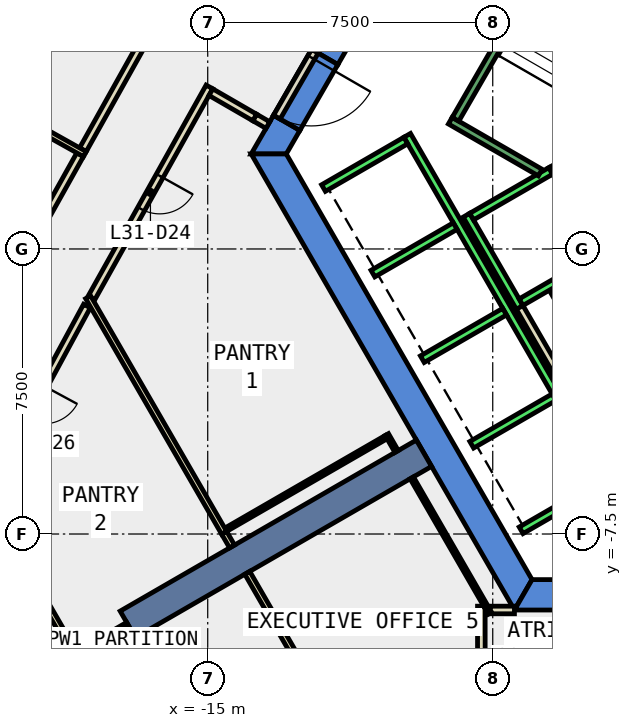
"""IFC4 building model, lengths in metres.
Left out: names, types, materials, properties, quantities, classifications, styles, units other than length and angle.
Written with IfcOpenShell. Run it as: python <this file> out.ifc"""

import sys

from ifc_helpers import new_model, si_unit, direction, frame, frame_2d, origin, place, context, subcontext, project, spatial, polyline, rectangle, outline, extrude, element, fill, save


model = new_model("IFC4")
c1 = context("Model", 3, precision=1e-05, world=origin(), true_north=direction((0.0, 1.0)))
c2 = subcontext(c1, "Body", "Model", "MODEL_VIEW")
j1 = project(units=[si_unit("LENGTHUNIT", "METRE"), si_unit("PLANEANGLEUNIT", "RADIAN")], contexts=[c1])
p1 = place(None, origin())
s1 = spatial("IfcSite", under=j1, at=p1, CompositionType="ELEMENT")
p2 = place(p1, origin())
s2 = spatial("IfcBuilding", under=s1, at=p2, CompositionType="ELEMENT")
p3 = place(p2, frame((0.0, 0.0, 142.4)))
s3 = spatial("IfcBuildingStorey", under=s2, at=p3, CompositionType="ELEMENT", Elevation=142.4)
p4 = place(p3, frame((0.0, 0.0, -0.4)))
e1 = element("IfcWall", 1, at=p4, inside=s3, PredefinedType="SHEAR", context=c2, shape_type="SweptSolid", body=[
    extrude(outline(polyline([(-12.267, 5.252), (-11.575, 4.852), (-6.466, 13.7), (-6.928, 14.5), (-12.267, 5.252)])), origin(), (0.0, 0.0, 1.0), 4.2),
])
p5 = place(p3, frame((0.0, 0.0, -0.4)))
e2 = element("IfcWall", 2, at=p5, inside=s3, PredefinedType="SHEAR", context=c2, shape_type="SweptSolid", body=[
    extrude(outline(polyline([(-12.575, 3.12), (-13.267, 3.52), (-13.856, 2.5), (-12.933, 2.5), (-12.575, 3.12)])), origin(), (0.0, 0.0, 1.0), 4.2),
])
p6 = place(p3, frame((0.0, 0.0, 3.6)))
e3 = element("IfcWall", 3, at=p6, inside=s3, PredefinedType="SHEAR", context=c2, shape_type="SweptSolid", body=[
    extrude(outline(polyline([(-13.267, 3.52), (-12.575, 3.12), (-11.575, 4.852), (-12.267, 5.252), (-13.267, 3.52)])), origin(), (0.0, 0.0, 1.0), 0.2),
])
p7 = place(p3, frame((0.0, 0.0, -0.4)))
e4 = element("IfcWall", 4, at=p7, inside=s3, PredefinedType="SHEAR", context=c2, shape_type="SweptSolid", body=[
    extrude(outline(polyline([(-13.856, 2.5), (-6.928, -9.5), (-6.466, -8.7), (-12.933, 2.5), (-13.856, 2.5)])), origin(), (0.0, 0.0, 1.0), 4.2),
])
p8 = place(p3, frame((0.0, 0.0, -0.4)))
e5 = element("IfcWall", 5, at=p8, inside=s3, PredefinedType="SHEAR", context=c2, shape_type="SweptSolid", body=[
    extrude(outline(polyline([(3.75, -9.5), (3.75, -8.7), (-6.466, -8.7), (-6.928, -9.5), (3.75, -9.5)])), origin(), (0.0, 0.0, 1.0), 4.2),
])
p9 = place(p3, frame((-9.31, -5.375, -0.4), z_axis=(0.0, 0.0, 1.0), x_axis=(-0.866017533419, -0.500013631625, 0.0)))
e6 = element("IfcWall", 6, at=p9, inside=s3, PredefinedType="SHEAR", context=c2, shape_type="SweptSolid", body=[
    extrude(rectangle(XDim=9.0, YDim=0.8, at=frame_2d((4.5, 0.0))), origin(), (0.0, 0.0, 1.0), 4.2),
])
p10 = place(p3, frame((-13.417, 3.26, 0.0), z_axis=(0.0, 0.0, 1.0), x_axis=(-0.866398669086, 0.499352927503, 0.0)))
e7 = element("IfcWall", 7, at=p10, inside=s3, PredefinedType="PARTITIONING", context=c2, shape_type="SweptSolid", body=[
    extrude(rectangle(XDim=0.4, YDim=0.2, at=frame_2d((0.2, 0.0))), origin(), (0.0, 0.0, 1.0), 2.4),
])
p11 = place(p3, frame((-14.955, 4.264, 0.0), z_axis=(0.0, 0.0, 1.0), x_axis=(-0.4879770011, -0.872856486713, 0.0)))
e8 = element("IfcWall", 8, at=p11, inside=s3, PredefinedType="PARTITIONING", context=c2, shape_type="SweptSolid", body=[
    extrude(rectangle(XDim=6.363, YDim=0.2, at=frame_2d((3.182, 0.0))), origin(), (0.0, 0.0, 1.0), 3.8),
])
p12 = place(p11, frame((2.681, 0.0, 0.0)))
e9 = element("IfcOpeningElement", 9, at=p12, cuts=e8, PredefinedType="OPENING", context=c2, shape_type="SweptSolid", body=[
    extrude(rectangle(XDim=1.0, YDim=2.1, at=frame_2d((0.5, 1.05))), frame((0.0, 0.11, 0.0), z_axis=(0.0, -1.0, 0.0), x_axis=(1.0, 0.0, 0.0)), (0.0, 0.0, 1.0), 0.22),
])
p13 = place(p3, frame((-18.178, -1.501, 0.0), z_axis=(0.0, 0.0, 1.0), x_axis=(-0.475923642768, -0.879486603795, 0.0)))
e10 = element("IfcWall", 10, at=p13, inside=s3, PredefinedType="PARTITIONING", context=c2, shape_type="SweptSolid", body=[
    extrude(rectangle(XDim=5.776, YDim=0.2, at=frame_2d((2.888, 0.0))), origin(), (0.0, 0.0, 1.0), 3.8),
])
p14 = place(p13, frame((2.388, 0.0, 0.0)))
e11 = element("IfcOpeningElement", 11, at=p14, cuts=e10, PredefinedType="OPENING", context=c2, shape_type="SweptSolid", body=[
    extrude(rectangle(XDim=1.0, YDim=2.1, at=frame_2d((0.5, 1.05))), frame((0.0, 0.11, 0.0), z_axis=(0.0, -1.0, 0.0), x_axis=(1.0, 0.0, 0.0)), (0.0, 0.0, 1.0), 0.22),
])
p15 = place(p3, frame((-18.284, 2.612, 0.0), z_axis=(0.0, 0.0, 1.0), x_axis=(0.487871212611, 0.872915620152, 0.0)))
e12 = element("IfcWall", 12, at=p15, inside=s3, PredefinedType="PARTITIONING", context=c2, shape_type="SweptSolid", body=[
    extrude(rectangle(XDim=3.402, YDim=0.2, at=frame_2d((1.701, 0.0))), origin(), (0.0, 0.0, 1.0), 3.8),
])
p16 = place(p3, frame((-20.018, -0.489, 0.0), z_axis=(0.0, 0.0, 1.0), x_axis=(0.48792588674, 0.872885060617, 0.0)))
e13 = element("IfcWall", 13, at=p16, inside=s3, PredefinedType="PARTITIONING", context=c2, shape_type="SweptSolid", body=[
    extrude(rectangle(XDim=3.403, YDim=0.2, at=frame_2d((1.701, 0.0))), origin(), (0.0, 0.0, 1.0), 3.8),
])
p17 = place(p3, frame((-5.126, -2.422, 0.0), z_axis=(0.0, 0.0, 1.0), x_axis=(-0.500062241894, 0.865989465428, 0.0)))
e14 = element("IfcWall", 14, at=p17, inside=s3, PredefinedType="PARTITIONING", context=c2, shape_type="SweptSolid", body=[
    extrude(rectangle(XDim=1.7, YDim=0.2, at=frame_2d((0.85, 0.0))), origin(), (0.0, 0.0, 1.0), 3.8),
])
p18 = place(p3, frame((-5.492, -3.788, 0.0), z_axis=(0.0, 0.0, 1.0), x_axis=(-0.500008949224, 0.866020236886, 0.0)))
e15 = element("IfcWall", 15, at=p18, inside=s3, PredefinedType="PARTITIONING", context=c2, shape_type="SweptSolid", body=[
    extrude(rectangle(XDim=2.68, YDim=0.2, at=frame_2d((1.34, 0.0))), origin(), (0.0, 0.0, 1.0), 3.8),
])
p19 = place(p3, frame((-7.572, -9.499, 0.0), z_axis=(0.0, 0.0, 1.0), x_axis=(1.0, 0.0, 0.0)))
e16 = element("IfcWall", 16, at=p19, inside=s3, PredefinedType="PARTITIONING", context=c2, shape_type="SweptSolid", body=[
    extrude(rectangle(XDim=0.643, YDim=0.2, at=frame_2d((0.322, 0.0))), origin(), (0.0, 0.0, 1.0), 3.8),
])
p20 = place(p3, frame((-7.8, -15.139, 0.0), z_axis=(0.0, 0.0, 1.0), x_axis=(0.0, 1.0, 0.0)))
e17 = element("IfcWall", 17, at=p20, inside=s3, PredefinedType="PARTITIONING", context=c2, shape_type="SweptSolid", body=[
    extrude(rectangle(XDim=5.74, YDim=0.2, at=frame_2d((2.87, 0.0))), origin(), (0.0, 0.0, 1.0), 3.8),
])
p21 = place(p20, frame((2.37, 0.0, 0.0)))
e18 = element("IfcOpeningElement", 18, at=p21, cuts=e17, PredefinedType="OPENING", context=c2, shape_type="SweptSolid", body=[
    extrude(rectangle(XDim=1.0, YDim=2.1, at=frame_2d((0.5, 1.05))), frame((0.0, 0.11, 0.0), z_axis=(0.0, -1.0, 0.0), x_axis=(1.0, 0.0, 0.0)), (0.0, 0.0, 1.0), 0.22),
])
p22 = place(p3, frame((-7.572, -9.586, 0.0), z_axis=(0.0, 0.0, 1.0), x_axis=(-0.500037407586, 0.866003805427, 0.0)))
e19 = element("IfcWall", 19, at=p22, inside=s3, PredefinedType="PARTITIONING", context=c2, shape_type="SweptSolid", body=[
    extrude(rectangle(XDim=4.115, YDim=0.1, at=frame_2d((2.058, 0.0))), origin(), (0.0, 0.0, 1.0), 3.8),
])
p23 = place(p3, frame((-10.305, -4.951, 0.0), z_axis=(0.0, 0.0, 1.0), x_axis=(-0.866031185235, -0.4999899861, 0.0)))
e20 = element("IfcWall", 20, at=p23, inside=s3, PredefinedType="PARTITIONING", context=c2, shape_type="SweptSolid", body=[
    extrude(rectangle(XDim=4.95, YDim=0.1, at=frame_2d((2.475, 0.0))), origin(), (0.0, 0.0, 1.0), 3.8),
])
p24 = place(p3, frame((-14.567, -7.469, 0.0), z_axis=(0.0, 0.0, 1.0), x_axis=(-0.500056007527, 0.865993065409, 0.0)))
e21 = element("IfcWall", 21, at=p24, inside=s3, PredefinedType="PARTITIONING", context=c2, shape_type="SweptSolid", body=[
    extrude(rectangle(XDim=7.159, YDim=0.15, at=frame_2d((3.58, 0.0))), origin(), (0.0, 0.0, 1.0), 3.8),
])
p25 = place(p3, frame((-14.359, -7.828, 0.0), z_axis=(0.0, 0.0, 1.0), x_axis=(-0.501453821755, 0.865184410775, 0.0)))
e22 = element("IfcWall", 22, at=p25, inside=s3, PredefinedType="PARTITIONING", context=c2, shape_type="SweptSolid", body=[
    extrude(rectangle(XDim=0.415, YDim=0.15, at=frame_2d((0.208, 0.0))), origin(), (0.0, 0.0, 1.0), 3.8),
])
p26 = place(p3, frame((-10.18, -15.068, 0.0), z_axis=(0.0, 0.0, 1.0), x_axis=(-0.499907901386, 0.866078570415, 0.0)))
e23 = element("IfcWall", 23, at=p26, inside=s3, PredefinedType="PARTITIONING", context=c2, shape_type="SweptSolid", body=[
    extrude(rectangle(XDim=7.56, YDim=0.15, at=frame_2d((3.78, 0.0))), origin(), (0.0, 0.0, 1.0), 3.8),
])
p27 = place(p3, frame((-17.108, -9.869, 0.0), z_axis=(0.0, 0.0, 1.0), x_axis=(-0.866054481515, -0.499949632511, 0.0)))
e24 = element("IfcWall", 24, at=p27, inside=s3, PredefinedType="PARTITIONING", context=c2, shape_type="SweptSolid", body=[
    extrude(rectangle(XDim=1.675, YDim=0.1, at=frame_2d((0.837, 0.0))), origin(), (0.0, 0.0, 1.0), 3.8),
])
p28 = place(p3, frame((-18.518, -10.625, 0.0), z_axis=(0.0, 0.0, 1.0), x_axis=(-0.50001189137, 0.86601853819, 0.0)))
e25 = element("IfcWall", 25, at=p28, inside=s3, PredefinedType="PARTITIONING", context=c2, shape_type="SweptSolid", body=[
    extrude(rectangle(XDim=4.746, YDim=0.15, at=frame_2d((2.373, 0.0))), origin(), (0.0, 0.0, 1.0), 3.8),
])
p29 = place(p3, frame((-18.234, 2.497, 0.0), z_axis=(0.0, 0.0, 1.0), x_axis=(-0.872820235044, 0.4880418397, 0.0)))
e26 = element("IfcWall", 26, at=p29, inside=s3, PredefinedType="PARTITIONING", context=c2, shape_type="SweptSolid", body=[
    extrude(rectangle(XDim=6.7, YDim=0.15, at=frame_2d((3.35, 0.0))), origin(), (0.0, 0.0, 1.0), 3.8),
])
p30 = place(p3, frame((-12.18, 5.202, 0.0), z_axis=(0.0, 0.0, 1.0), x_axis=(-0.50002537861, -0.866010750942, 0.0)))
e27 = element("IfcWall", 27, at=p30, inside=s3, PredefinedType="PARTITIONING", context=c2, shape_type="SweptSolid", body=[
    extrude(rectangle(XDim=2.0, YDim=0.2, at=frame_2d((1.0, 0.0))), origin(), (0.0, 0.0, 1.0), 2.4),
])
p31 = place(p30, frame((0.19, 0.0, 0.0)))
e28 = element("IfcOpeningElement", 28, at=p31, cuts=e27, PredefinedType="OPENING", context=c2, shape_type="SweptSolid", body=[
    extrude(rectangle(XDim=1.8, YDim=2.1, at=frame_2d((0.9, 1.05))), frame((0.0, 0.11, 0.0), z_axis=(0.0, -1.0, 0.0), x_axis=(1.0, 0.0, 0.0)), (0.0, 0.0, 1.0), 0.22),
])
p32 = place(p3, frame((-10.03, -5.329, 0.0), z_axis=(0.0, 0.0, 1.0), x_axis=(-0.499352927503, 0.866398669086, 0.0)))
e29 = element("IfcWall", 29, at=p32, inside=s3, PredefinedType="PARTITIONING", context=c2, shape_type="SweptSolid", body=[
    extrude(rectangle(XDim=0.515, YDim=0.1, at=frame_2d((0.257, 0.0))), origin(), (0.0, 0.0, 1.0), 3.8),
])
p33 = place(p3, frame((-13.764, 3.46, 0.0), z_axis=(0.0, 0.0, 1.0), x_axis=(-0.865932130826, 0.500161518715, 0.0)))
e30 = element("IfcWall", 30, at=p33, inside=s3, PredefinedType="PARTITIONING", context=c2, shape_type="SweptSolid", body=[
    extrude(rectangle(XDim=1.332, YDim=0.2, at=frame_2d((0.666, 0.0))), origin(), (0.0, 0.0, 1.0), 3.8),
])
p34 = place(p3, frame((-5.94, 2.188, 0.0), z_axis=(0.0, 0.0, 1.0), x_axis=(0.49994636267, -0.866056369097, 0.0)))
e31 = element("IfcWall", 31, at=p34, inside=s3, PredefinedType="STANDARD", context=c2, shape_type="SweptSolid", body=[
    extrude(rectangle(XDim=2.8, YDim=0.2, at=frame_2d((1.4, 0.0))), origin(), (0.0, 0.0, 1.0), 3.8),
])
p35 = place(p34, frame((1.225, 0.0, 0.0)))
e32 = element("IfcOpeningElement", 32, at=p35, cuts=e31, PredefinedType="OPENING", context=c2, shape_type="SweptSolid", body=[
    extrude(rectangle(XDim=1.1, YDim=2.1, at=frame_2d((0.55, 1.05))), frame((0.0, 0.11, 0.0), z_axis=(0.0, -1.0, 0.0), x_axis=(1.0, 0.0, 0.0)), (0.0, 0.0, 1.0), 0.22),
])
p36 = place(p3, frame((-8.192, 0.888, 0.0), z_axis=(0.0, 0.0, 1.0), x_axis=(0.49994636267, -0.866056369097, 0.0)))
e33 = element("IfcWall", 33, at=p36, inside=s3, PredefinedType="STANDARD", context=c2, shape_type="SweptSolid", body=[
    extrude(rectangle(XDim=2.8, YDim=0.2, at=frame_2d((1.4, 0.0))), origin(), (0.0, 0.0, 1.0), 3.8),
])
for number, where, z_axis, x_axis in (
    (34, (-5.977, 2.052, 0.0), (0.0, 0.0, 1.0), (-0.866, -0.5, 0.0)),
    (35, (-4.677, -0.2, 0.0), (0.0, 0.0, 1.0), (-0.866, -0.5, 0.0)),
):
    element("IfcWall", number, at=place(p3, frame(where, z_axis=z_axis, x_axis=x_axis)), inside=s3, PredefinedType="STANDARD", context=c2, shape_type="SweptSolid", body=[
        extrude(rectangle(XDim=2.399, YDim=0.2, at=frame_2d((1.2, 0.0))), origin(), (0.0, 0.0, 1.0), 3.8),
    ])
p37 = place(p3, frame((-9.751, 2.99, 0.0), z_axis=(0.0, 0.0, 1.0), x_axis=(0.50000090737, -0.866024879913, 0.0)))
e36 = element("IfcWall", 36, at=p37, inside=s3, PredefinedType="STANDARD", context=c2, shape_type="SweptSolid", body=[
    extrude(rectangle(XDim=10.6, YDim=0.2, at=frame_2d((5.3, 0.0))), origin(), (0.0, 0.0, 1.0), 3.8),
])
p38 = place(p3, frame((-9.788, 2.853, 0.0), z_axis=(0.0, 0.0, 1.0), x_axis=(-0.865998541277, -0.500046524342, 0.0)))
e37 = element("IfcWall", 37, at=p38, inside=s3, PredefinedType="STANDARD", context=c2, shape_type="SweptSolid", body=[
    extrude(rectangle(XDim=2.5, YDim=0.2, at=frame_2d((1.25, 0.0))), origin(), (0.0, 0.0, 1.0), 3.8),
])
for number, where, z_axis, x_axis in (
    (38, (-8.488, 0.602, 0.0), (0.0, 0.0, 1.0), (-0.866, -0.5, 0.0)),
    (39, (-7.188, -1.65, 0.0), (0.0, 0.0, 1.0), (-0.866, -0.5, 0.0)),
    (40, (-5.888, -3.902, 0.0), (0.0, 0.0, 1.0), (-0.866, -0.5, 0.0)),
    (41, (-4.588, -6.153, 0.0), (0.0, 0.0, 1.0), (-0.866, -0.5, 0.0)),
):
    element("IfcWall", number, at=place(p3, frame(where, z_axis=z_axis, x_axis=x_axis)), inside=s3, PredefinedType="STANDARD", context=c2, shape_type="SweptSolid", body=[
        extrude(rectangle(XDim=2.5, YDim=0.2, at=frame_2d((1.25, 0.0))), origin(), (0.0, 0.0, 1.0), 3.8),
    ])
p39 = place(p3, frame((-6.25, 2.01, 0.0), z_axis=(0.0, 0.0, 1.0), x_axis=(-0.86611865017, 0.499838457731, 0.0)))
e42 = element("IfcWall", 42, at=p39, inside=s3, PredefinedType="STANDARD", context=c2, shape_type="SweptSolid", body=[
    extrude(rectangle(XDim=2.733, YDim=0.2, at=frame_2d((1.366, 0.0))), origin(), (0.0, 0.0, 1.0), 3.8),
])
p40 = place(p3, frame((-5.03, 9.388, 0.0), z_axis=(0.0, 0.0, 1.0), x_axis=(-0.499978703459, -0.866037698999, 0.0)))
e43 = element("IfcWall", 43, at=p40, inside=s3, PredefinedType="STANDARD", context=c2, shape_type="SweptSolid", body=[
    extrude(rectangle(XDim=6.9, YDim=0.2, at=frame_2d((3.45, 0.0))), origin(), (0.0, 0.0, 1.0), 3.8),
])
p41 = place(p12, origin())
e44 = element("IfcDoor", 44, at=p41, inside=s3, OperationType="SINGLE_SWING_LEFT", PredefinedType="DOOR", context=c2, shape_type="SweptSolid", body=[
    extrude(rectangle(XDim=1.0, YDim=2.1, at=frame_2d((0.5, 1.05))), frame((0.0, 0.025, 0.0), z_axis=(0.0, -1.0, 0.0), x_axis=(1.0, 0.0, 0.0)), (0.0, 0.0, 1.0), 0.05),
])
fill(e9, e44)
p42 = place(p31, origin())
e45 = element("IfcDoor", 45, at=p42, inside=s3, OperationType="DOUBLE_DOOR_SINGLE_SWING", PredefinedType="DOOR", context=c2, shape_type="SweptSolid", body=[
    extrude(rectangle(XDim=1.8, YDim=2.1, at=frame_2d((0.9, 1.05))), frame((0.0, 0.025, 0.0), z_axis=(0.0, -1.0, 0.0), x_axis=(1.0, 0.0, 0.0)), (0.0, 0.0, 1.0), 0.05),
])
fill(e28, e45)
save(model, sys.argv[1])
